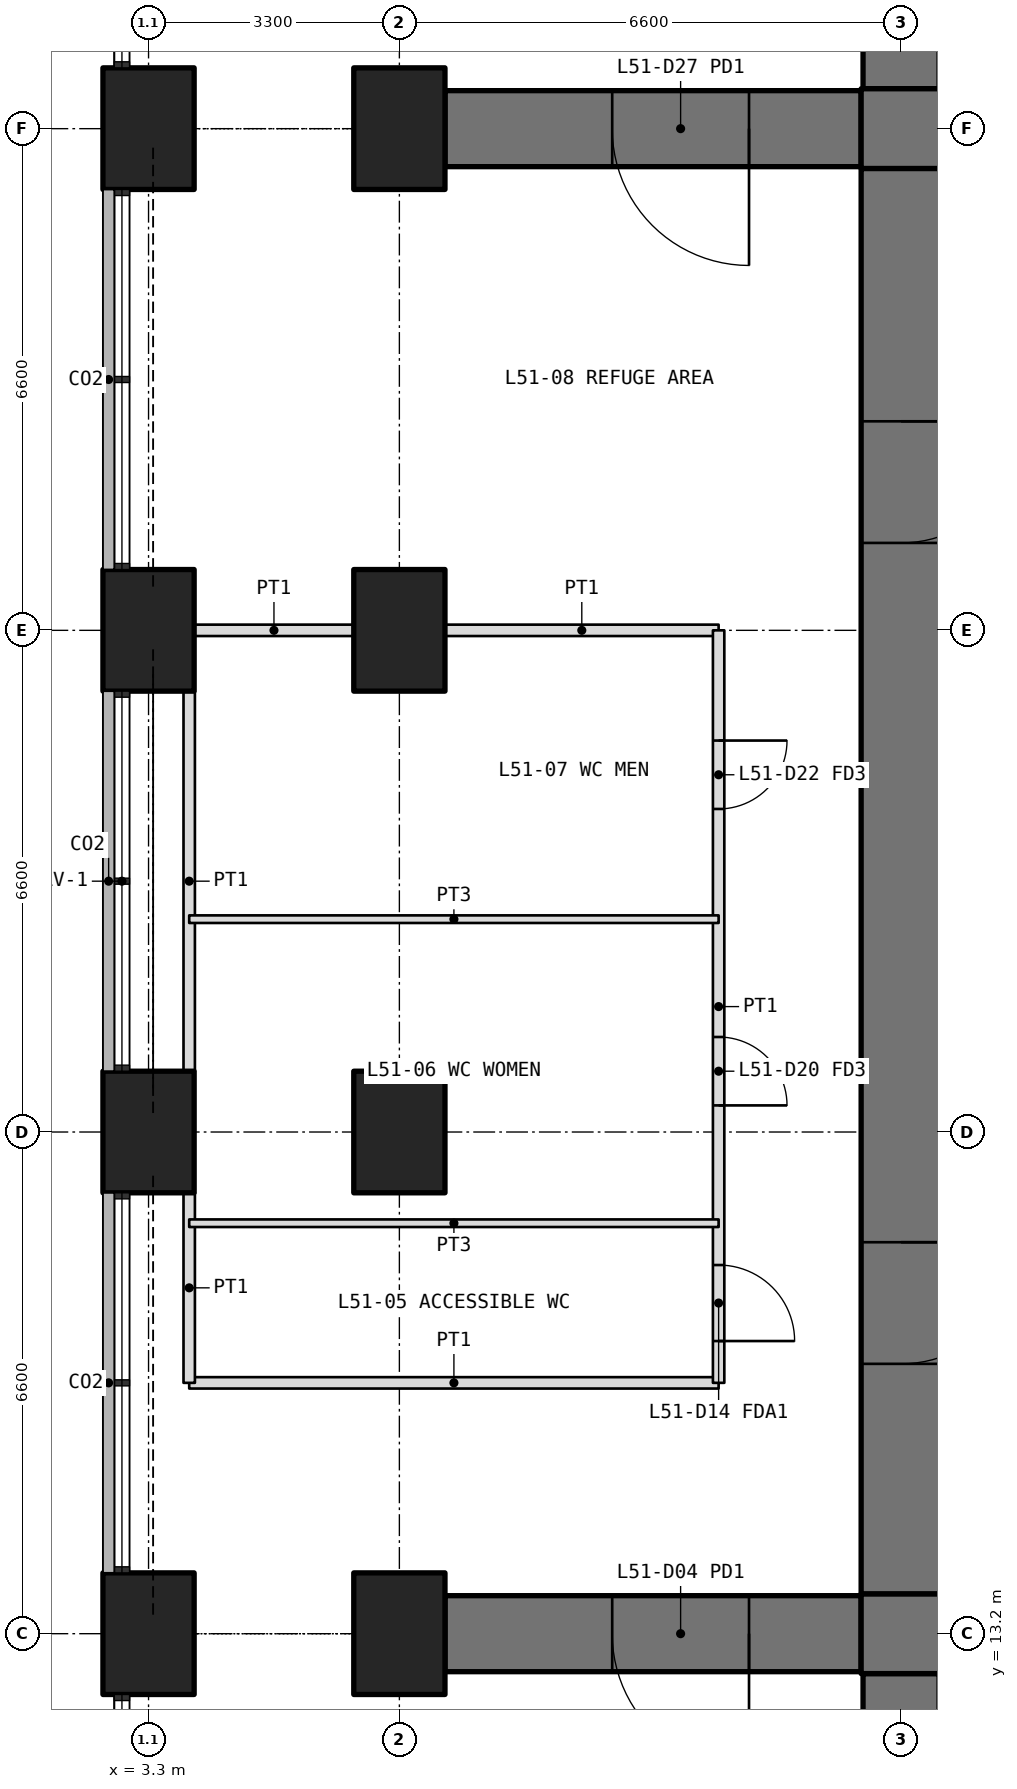
"""IFC4 building model, lengths in metres.
Left out: names, types, materials, properties, quantities, classifications, styles, units other than length and angle.
Written with IfcOpenShell. Run it as: python <this file> out.ifc"""

import sys

from ifc_helpers import new_model, si_unit, direction, frame, frame_2d, origin, origin_2d, place, context, subcontext, project, spatial, rectangle, extrude, element, fill, save


model = new_model("IFC4")
c1 = context("Model", 3, precision=1e-05, world=origin(), true_north=direction((0.0, 1.0)))
c2 = subcontext(c1, "Body", "Model", "MODEL_VIEW")
j1 = project(units=[si_unit("LENGTHUNIT", "METRE"), si_unit("PLANEANGLEUNIT", "RADIAN")], contexts=[c1])
p1 = place(None, origin())
s1 = spatial("IfcSite", under=j1, at=p1, CompositionType="ELEMENT")
p2 = place(p1, origin())
s2 = spatial("IfcBuilding", under=s1, at=p2, CompositionType="ELEMENT")
p3 = place(p2, frame((0.0, 0.0, 222.9)))
s3 = spatial("IfcBuildingStorey", under=s2, at=p3, CompositionType="ELEMENT", Elevation=222.9)
for number, where, z_axis, x_axis in (
    (1, (3.3, 13.2, 0.0), (0.0, 0.0, 1.0), (0.0, 1.0, 0.0)),
    (2, (3.3, 19.8, 0.0), (0.0, 0.0, 1.0), (0.0, 1.0, 0.0)),
    (3, (3.3, 26.4, 0.0), (0.0, 0.0, 1.0), (0.0, 1.0, 0.0)),
    (4, (3.3, 33.0, 0.0), (0.0, 0.0, 1.0), (0.0, 1.0, 0.0)),
    (5, (6.6, 13.2, 0.0), (0.0, 0.0, 1.0), (0.0, 1.0, 0.0)),
    (6, (6.6, 19.8, 0.0), (0.0, 0.0, 1.0), (0.0, 1.0, 0.0)),
    (7, (6.6, 26.4, 0.0), (0.0, 0.0, 1.0), (0.0, 1.0, 0.0)),
    (8, (6.6, 33.0, 0.0), (0.0, 0.0, 1.0), (0.0, 1.0, 0.0)),
):
    element("IfcColumn", number, at=place(p3, frame(where, z_axis=z_axis, x_axis=x_axis)), inside=s3, PredefinedType="COLUMN", context=c2, shape_type="SweptSolid", body=[
        extrude(rectangle(XDim=1.6, YDim=1.2, at=origin_2d()), origin(), (0.0, 0.0, 1.0), 6.3),
    ])
p4 = place(p3, frame((13.2, 12.675, 0.0), z_axis=(0.0, 0.0, 1.0), x_axis=(0.0, -1.0, 0.0)))
e9 = element("IfcWall", 9, at=p4, inside=s3, PredefinedType="SHEAR", context=c2, shape_type="SweptSolid", body=[
    extrude(rectangle(XDim=8.775, YDim=1.0, at=frame_2d((4.388, 0.0))), origin(), (0.0, 0.0, 1.0), 6.0),
])
p5 = place(p4, frame((1.475, 0.0, 0.0)))
e10 = element("IfcOpeningElement", 10, at=p5, cuts=e9, PredefinedType="OPENING", context=c2, shape_type="SweptSolid", body=[
    extrude(rectangle(XDim=1.8, YDim=2.4, at=frame_2d((0.9, 1.2))), frame((0.0, 0.51, 0.0), z_axis=(0.0, -1.0, 0.0), x_axis=(1.0, 0.0, 0.0)), (0.0, 0.0, 1.0), 1.02),
])
p6 = place(p3, frame((13.2, 33.525, 0.0), z_axis=(0.0, 0.0, 1.0), x_axis=(0.0, 1.0, 0.0)))
e11 = element("IfcWall", 11, at=p6, inside=s3, PredefinedType="SHEAR", context=c2, shape_type="SweptSolid", body=[
    extrude(rectangle(XDim=8.775, YDim=1.0, at=frame_2d((4.388, 0.0))), origin(), (0.0, 0.0, 1.0), 6.0),
])
p7 = place(p6, frame((1.475, 0.0, 0.0)))
e12 = element("IfcOpeningElement", 12, at=p7, cuts=e11, PredefinedType="OPENING", context=c2, shape_type="SweptSolid", body=[
    extrude(rectangle(XDim=1.8, YDim=2.4, at=frame_2d((0.9, 1.2))), frame((0.0, 0.51, 0.0), z_axis=(0.0, -1.0, 0.0), x_axis=(1.0, 0.0, 0.0)), (0.0, 0.0, 1.0), 1.02),
])
p8 = place(p3, frame((12.675, 13.2, 0.0), z_axis=(0.0, 0.0, 1.0), x_axis=(-1.0, 0.0, 0.0)))
e13 = element("IfcWall", 13, at=p8, inside=s3, PredefinedType="SHEAR", context=c2, shape_type="SweptSolid", body=[
    extrude(rectangle(XDim=5.475, YDim=1.0, at=frame_2d((2.738, 0.0))), origin(), (0.0, 0.0, 1.0), 6.0),
])
p9 = place(p8, frame((1.475, 0.0, 0.0)))
e14 = element("IfcOpeningElement", 14, at=p9, cuts=e13, PredefinedType="OPENING", context=c2, shape_type="SweptSolid", body=[
    extrude(rectangle(XDim=1.8, YDim=2.4, at=frame_2d((0.9, 1.2))), frame((0.0, 0.51, 0.0), z_axis=(0.0, -1.0, 0.0), x_axis=(1.0, 0.0, 0.0)), (0.0, 0.0, 1.0), 1.02),
])
p10 = place(p3, frame((12.675, 33.0, 0.0), z_axis=(0.0, 0.0, 1.0), x_axis=(-1.0, 0.0, 0.0)))
e15 = element("IfcWall", 15, at=p10, inside=s3, PredefinedType="SHEAR", context=c2, shape_type="SweptSolid", body=[
    extrude(rectangle(XDim=5.475, YDim=1.0, at=frame_2d((2.738, 0.0))), origin(), (0.0, 0.0, 1.0), 6.0),
])
p11 = place(p10, frame((1.475, 0.0, 0.0)))
e16 = element("IfcOpeningElement", 16, at=p11, cuts=e15, PredefinedType="OPENING", context=c2, shape_type="SweptSolid", body=[
    extrude(rectangle(XDim=1.8, YDim=2.4, at=frame_2d((0.9, 1.2))), frame((0.0, 0.51, 0.0), z_axis=(0.0, -1.0, 0.0), x_axis=(1.0, 0.0, 0.0)), (0.0, 0.0, 1.0), 1.02),
])
for number, where, z_axis, x_axis in (
    (17, (12.675, 13.2, 0.0), (0.0, 0.0, 1.0), (1.0, 0.0, 0.0)),
    (18, (40.125, 33.0, 0.0), (0.0, 0.0, 1.0), (-1.0, 0.0, 0.0)),
):
    element("IfcWall", number, at=place(p3, frame(where, z_axis=z_axis, x_axis=x_axis)), inside=s3, PredefinedType="SHEAR", context=c2, shape_type="SweptSolid", body=[
        extrude(rectangle(XDim=27.45, YDim=1.05, at=frame_2d((13.725, 0.0))), origin(), (0.0, 0.0, 1.0), 6.3),
    ])
p12 = place(p3, frame((13.2, 32.475, 0.0), z_axis=(0.0, 0.0, 1.0), x_axis=(0.0, -1.0, 0.0)))
e19 = element("IfcWall", 19, at=p12, inside=s3, PredefinedType="SHEAR", context=c2, shape_type="SweptSolid", body=[
    extrude(rectangle(XDim=18.75, YDim=1.05, at=frame_2d((9.375, 0.0))), origin(), (0.0, 0.0, 1.0), 6.3),
])
p13 = place(p12, frame((14.125, 0.0, 0.0)))
e20 = element("IfcOpeningElement", 20, at=p13, cuts=e19, PredefinedType="OPENING", context=c2, shape_type="SweptSolid", body=[
    extrude(rectangle(XDim=1.6, YDim=2.1, at=frame_2d((0.8, 1.05))), frame((0.0, 0.535, 0.0), z_axis=(0.0, -1.0, 0.0), x_axis=(1.0, 0.0, 0.0)), (0.0, 0.0, 1.0), 1.07),
])
p14 = place(p12, frame((3.325, 0.0, 0.0)))
e21 = element("IfcOpeningElement", 21, at=p14, cuts=e19, PredefinedType="OPENING", context=c2, shape_type="SweptSolid", body=[
    extrude(rectangle(XDim=1.6, YDim=2.1, at=frame_2d((0.8, 1.05))), frame((0.0, 0.535, 0.0), z_axis=(0.0, -1.0, 0.0), x_axis=(1.0, 0.0, 0.0)), (0.0, 0.0, 1.0), 1.07),
])
p15 = place(p3, frame((10.8, 16.5, 0.0), z_axis=(0.0, 0.0, 1.0), x_axis=(-1.0, 0.0, 0.0)))
e22 = element("IfcWall", 22, at=p15, inside=s3, PredefinedType="PARTITIONING", context=c2, shape_type="SweptSolid", body=[
    extrude(rectangle(XDim=6.965, YDim=0.15, at=frame_2d((3.482, 0.0))), origin(), (0.0, 0.0, 1.0), 4.0),
])
p16 = place(p3, frame((3.9, 26.4, 0.0), z_axis=(0.0, 0.0, 1.0), x_axis=(1.0, 0.0, 0.0)))
e23 = element("IfcWall", 23, at=p16, inside=s3, PredefinedType="PARTITIONING", context=c2, shape_type="SweptSolid", body=[
    extrude(rectangle(XDim=2.1, YDim=0.15, at=frame_2d((1.05, 0.0))), origin(), (0.0, 0.0, 1.0), 4.0),
])
p17 = place(p3, frame((7.2, 26.4, 0.0), z_axis=(0.0, 0.0, 1.0), x_axis=(1.0, 0.0, 0.0)))
e24 = element("IfcWall", 24, at=p17, inside=s3, PredefinedType="PARTITIONING", context=c2, shape_type="SweptSolid", body=[
    extrude(rectangle(XDim=3.6, YDim=0.15, at=frame_2d((1.8, 0.0))), origin(), (0.0, 0.0, 1.0), 4.0),
])
p18 = place(p3, frame((3.835, 16.5, 0.0), z_axis=(0.0, 0.0, 1.0), x_axis=(0.0, 1.0, 0.0)))
e25 = element("IfcWall", 25, at=p18, inside=s3, PredefinedType="PARTITIONING", context=c2, shape_type="SweptSolid", body=[
    extrude(rectangle(XDim=2.5, YDim=0.15, at=frame_2d((1.25, 0.0))), origin(), (0.0, 0.0, 1.0), 4.0),
])
p19 = place(p3, frame((3.835, 20.6, 0.0), z_axis=(0.0, 0.0, 1.0), x_axis=(0.0, 1.0, 0.0)))
e26 = element("IfcWall", 26, at=p19, inside=s3, PredefinedType="PARTITIONING", context=c2, shape_type="SweptSolid", body=[
    extrude(rectangle(XDim=5.0, YDim=0.15, at=frame_2d((2.5, 0.0))), origin(), (0.0, 0.0, 1.0), 4.0),
])
p20 = place(p3, frame((10.8, 26.4, 0.0), z_axis=(0.0, 0.0, 1.0), x_axis=(0.0, -1.0, 0.0)))
e27 = element("IfcWall", 27, at=p20, inside=s3, PredefinedType="PARTITIONING", context=c2, shape_type="SweptSolid", body=[
    extrude(rectangle(XDim=9.9, YDim=0.15, at=frame_2d((4.95, 0.0))), origin(), (0.0, 0.0, 1.0), 4.0),
])
p21 = place(p20, frame((8.35, 0.0, 0.0)))
e28 = element("IfcOpeningElement", 28, at=p21, cuts=e27, PredefinedType="OPENING", context=c2, shape_type="SweptSolid", body=[
    extrude(rectangle(XDim=1.0, YDim=2.1, at=frame_2d((0.5, 1.05))), frame((0.0, 0.085, 0.0), z_axis=(0.0, -1.0, 0.0), x_axis=(1.0, 0.0, 0.0)), (0.0, 0.0, 1.0), 0.17),
])
p22 = place(p20, frame((5.35, 0.0, 0.0)))
e29 = element("IfcOpeningElement", 29, at=p22, cuts=e27, PredefinedType="OPENING", context=c2, shape_type="SweptSolid", body=[
    extrude(rectangle(XDim=0.9, YDim=2.1, at=frame_2d((0.45, 1.05))), frame((0.0, 0.085, 0.0), z_axis=(0.0, -1.0, 0.0), x_axis=(1.0, 0.0, 0.0)), (0.0, 0.0, 1.0), 0.17),
])
p23 = place(p20, frame((1.45, 0.0, 0.0)))
e30 = element("IfcOpeningElement", 30, at=p23, cuts=e27, PredefinedType="OPENING", context=c2, shape_type="SweptSolid", body=[
    extrude(rectangle(XDim=0.9, YDim=2.1, at=frame_2d((0.45, 1.05))), frame((0.0, 0.085, 0.0), z_axis=(0.0, -1.0, 0.0), x_axis=(1.0, 0.0, 0.0)), (0.0, 0.0, 1.0), 0.17),
])
for number, where, z_axis, x_axis in (
    (31, (3.835, 18.6, 0.0), (0.0, 0.0, 1.0), (1.0, 0.0, 0.0)),
    (32, (3.835, 22.6, 0.0), (0.0, 0.0, 1.0), (1.0, 0.0, 0.0)),
):
    element("IfcWall", number, at=place(p3, frame(where, z_axis=z_axis, x_axis=x_axis)), inside=s3, PredefinedType="PARTITIONING", context=c2, shape_type="SweptSolid", body=[
        extrude(rectangle(XDim=6.965, YDim=0.1, at=frame_2d((3.482, 0.0))), origin(), (0.0, 0.0, 1.0), 4.0),
    ])
p24 = place(p21, origin())
e33 = element("IfcDoor", 33, at=p24, inside=s3, OperationType="SINGLE_SWING_RIGHT", PredefinedType="DOOR", context=c2, shape_type="SweptSolid", body=[
    extrude(rectangle(XDim=1.0, YDim=2.1, at=frame_2d((0.5, 1.05))), frame((0.0, 0.025, 0.0), z_axis=(0.0, -1.0, 0.0), x_axis=(1.0, 0.0, 0.0)), (0.0, 0.0, 1.0), 0.05),
])
fill(e28, e33)
p25 = place(p22, origin())
e34 = element("IfcDoor", 34, at=p25, inside=s3, OperationType="SINGLE_SWING_RIGHT", PredefinedType="DOOR", context=c2, shape_type="SweptSolid", body=[
    extrude(rectangle(XDim=0.9, YDim=2.1, at=frame_2d((0.45, 1.05))), frame((0.0, 0.025, 0.0), z_axis=(0.0, -1.0, 0.0), x_axis=(1.0, 0.0, 0.0)), (0.0, 0.0, 1.0), 0.05),
])
fill(e29, e34)
p26 = place(p23, origin())
e35 = element("IfcDoor", 35, at=p26, inside=s3, OperationType="SINGLE_SWING_LEFT", PredefinedType="DOOR", context=c2, shape_type="SweptSolid", body=[
    extrude(rectangle(XDim=0.9, YDim=2.1, at=frame_2d((0.45, 1.05))), frame((0.0, 0.025, 0.0), z_axis=(0.0, -1.0, 0.0), x_axis=(1.0, 0.0, 0.0)), (0.0, 0.0, 1.0), 0.05),
])
fill(e30, e35)
p27 = place(p9, origin())
e36 = element("IfcDoor", 36, at=p27, inside=s3, OperationType="DOUBLE_DOOR_SINGLE_SWING", PredefinedType="DOOR", context=c2, shape_type="SweptSolid", body=[
    extrude(rectangle(XDim=1.8, YDim=2.4, at=frame_2d((0.9, 1.2))), frame((0.0, 0.025, 0.0), z_axis=(0.0, -1.0, 0.0), x_axis=(1.0, 0.0, 0.0)), (0.0, 0.0, 1.0), 0.05),
])
fill(e14, e36)
p28 = place(p11, origin())
e37 = element("IfcDoor", 37, at=p28, inside=s3, OperationType="DOUBLE_DOOR_SINGLE_SWING", PredefinedType="DOOR", context=c2, shape_type="SweptSolid", body=[
    extrude(rectangle(XDim=1.8, YDim=2.4, at=frame_2d((0.9, 1.2))), frame((0.0, 0.025, 0.0), z_axis=(0.0, -1.0, 0.0), x_axis=(1.0, 0.0, 0.0)), (0.0, 0.0, 1.0), 0.05),
])
fill(e16, e37)
p29 = place(p13, origin())
e38 = element("IfcDoor", 38, at=p29, inside=s3, OperationType="DOUBLE_DOOR_DOUBLE_SWING", PredefinedType="DOOR", context=c2, shape_type="SweptSolid", body=[
    extrude(rectangle(XDim=1.6, YDim=2.1, at=frame_2d((0.8, 1.05))), frame((0.0, 0.025, 0.0), z_axis=(0.0, -1.0, 0.0), x_axis=(1.0, 0.0, 0.0)), (0.0, 0.0, 1.0), 0.05),
])
fill(e20, e38)
p30 = place(p14, origin())
e39 = element("IfcDoor", 39, at=p30, inside=s3, OperationType="DOUBLE_DOOR_DOUBLE_SWING", PredefinedType="DOOR", context=c2, shape_type="SweptSolid", body=[
    extrude(rectangle(XDim=1.6, YDim=2.1, at=frame_2d((0.8, 1.05))), frame((0.0, 0.025, 0.0), z_axis=(0.0, -1.0, 0.0), x_axis=(1.0, 0.0, 0.0)), (0.0, 0.0, 1.0), 0.05),
])
fill(e21, e39)
save(model, sys.argv[1])
